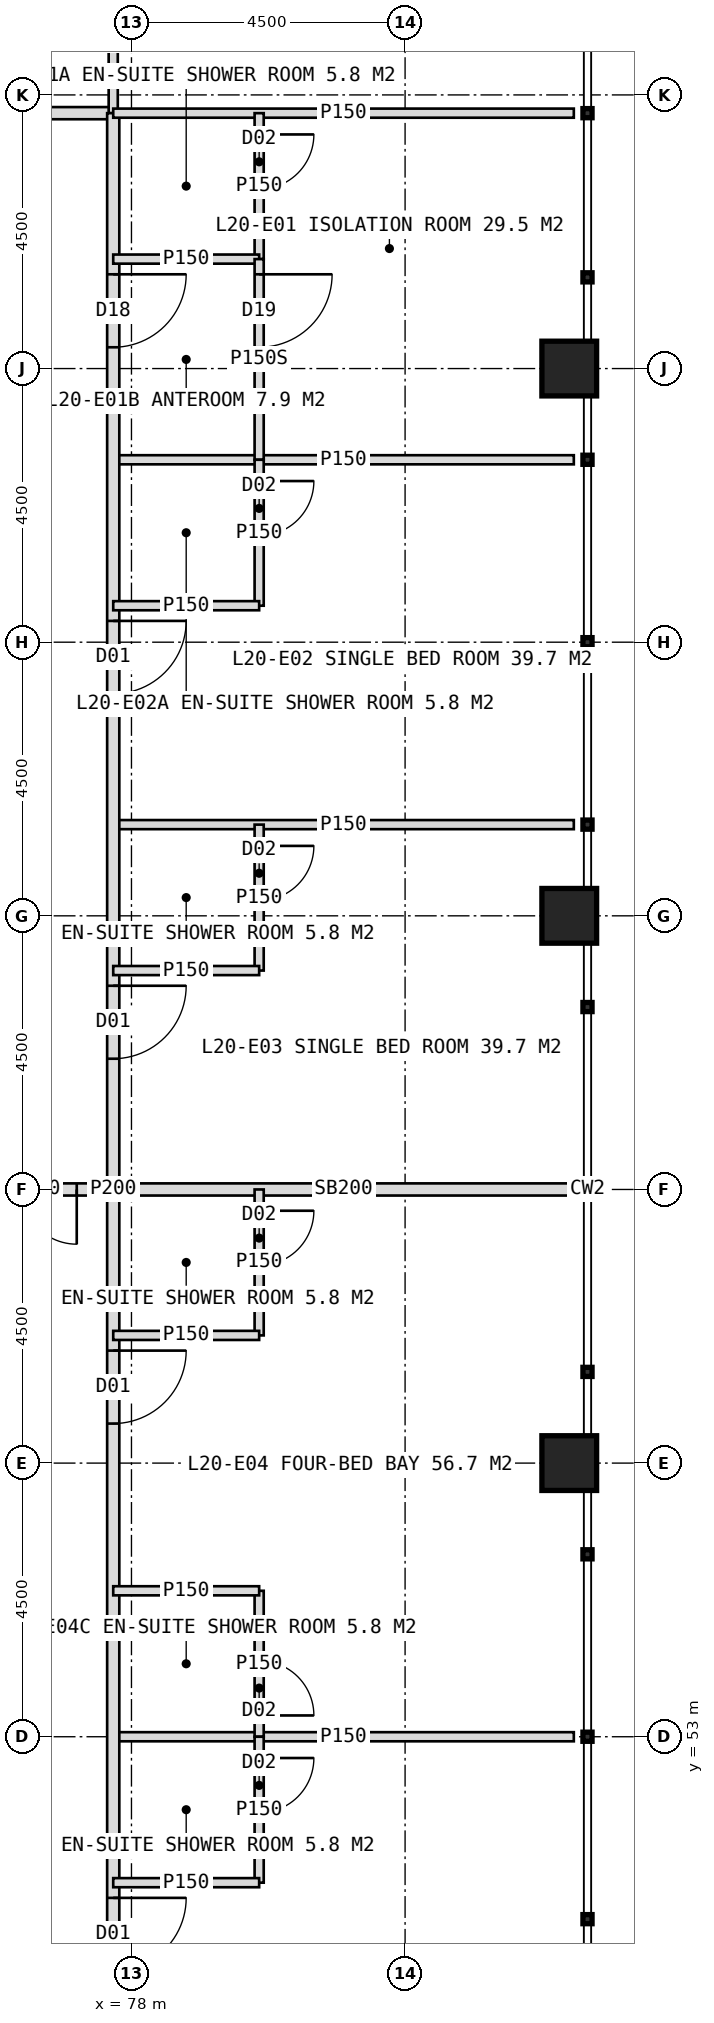
"""IFC4 building model, lengths in metres.
Left out: names, types, materials, properties, quantities, classifications, styles, units other than length and angle.
Written with IfcOpenShell. Run it as: python <this file> out.ifc"""

import sys

from ifc_helpers import new_model, si_unit, direction, frame, frame_2d, origin, origin_2d, place, context, subcontext, project, spatial, rectangle, hollow_rectangle, extrude, element, fill, save


model = new_model("IFC4")
c1 = context("Model", 3, precision=1e-05, world=origin(), true_north=direction((0.0, 1.0)))
c2 = subcontext(c1, "Body", "Model", "MODEL_VIEW")
j1 = project(units=[si_unit("LENGTHUNIT", "METRE"), si_unit("PLANEANGLEUNIT", "RADIAN")], contexts=[c1])
p1 = place(None, origin())
s1 = spatial("IfcSite", under=j1, at=p1, CompositionType="ELEMENT")
p2 = place(p1, origin())
s2 = spatial("IfcBuilding", under=s1, at=p2, CompositionType="ELEMENT")
p3 = place(p2, frame((0.0, 0.0, 87.0)))
s3 = spatial("IfcBuildingStorey", under=s2, at=p3, CompositionType="ELEMENT", Elevation=87.0)
for number, where, z_axis, x_axis in (
    (1, (85.2, 57.5, 0.0), (0.0, 0.0, 1.0), (1.0, 0.0, 0.0)),
    (2, (85.2, 66.5, 0.0), (0.0, 0.0, 1.0), (1.0, 0.0, 0.0)),
    (3, (85.2, 75.5, 0.0), (0.0, 0.0, 1.0), (1.0, 0.0, 0.0)),
):
    element("IfcColumn", number, at=place(p3, frame(where, z_axis=z_axis, x_axis=x_axis)), inside=s3, PredefinedType="COLUMN", context=c2, shape_type="SweptSolid", body=[
        extrude(hollow_rectangle(XDim=0.9, YDim=0.9, WallThickness=0.08, at=origin_2d()), origin(), (0.0, 0.0, 1.0), 4.0),
    ])
p4 = place(p3, frame((42.3, 79.7, 0.0), z_axis=(0.0, 0.0, 1.0), x_axis=(1.0, 0.0, 0.0)))
e4 = element("IfcWall", 4, at=p4, inside=s3, PredefinedType="PARTITIONING", context=c2, shape_type="SweptSolid", body=[
    extrude(rectangle(XDim=35.4, YDim=0.2, at=frame_2d((17.7, 0.0))), origin(), (0.0, 0.0, 1.0), 3.75),
])
p5 = place(p4, frame((2.65, 0.0, 0.0)))
e5 = element("IfcOpeningElement", 5, at=p5, cuts=e4, PredefinedType="OPENING", context=c2, shape_type="SweptSolid", body=[
    extrude(rectangle(XDim=1.2, YDim=2.2, at=frame_2d((0.6, 1.1))), frame((0.0, 0.11, 0.0), z_axis=(0.0, -1.0, 0.0), x_axis=(1.0, 0.0, 0.0)), (0.0, 0.0, 1.0), 0.22),
])
p6 = place(p4, frame((11.2, 0.0, 0.0)))
e6 = element("IfcOpeningElement", 6, at=p6, cuts=e4, PredefinedType="OPENING", context=c2, shape_type="SweptSolid", body=[
    extrude(rectangle(XDim=1.0, YDim=2.1, at=frame_2d((0.5, 1.05))), frame((0.0, 0.11, 0.0), z_axis=(0.0, -1.0, 0.0), x_axis=(1.0, 0.0, 0.0)), (0.0, 0.0, 1.0), 0.22),
])
p7 = place(p4, frame((17.2, 0.0, 0.0)))
e7 = element("IfcOpeningElement", 7, at=p7, cuts=e4, PredefinedType="OPENING", context=c2, shape_type="SweptSolid", body=[
    extrude(rectangle(XDim=1.0, YDim=2.1, at=frame_2d((0.5, 1.05))), frame((0.0, 0.11, 0.0), z_axis=(0.0, -1.0, 0.0), x_axis=(1.0, 0.0, 0.0)), (0.0, 0.0, 1.0), 0.22),
])
p8 = place(p4, frame((23.35, 0.0, 0.0)))
e8 = element("IfcOpeningElement", 8, at=p8, cuts=e4, PredefinedType="OPENING", context=c2, shape_type="SweptSolid", body=[
    extrude(rectangle(XDim=1.2, YDim=2.2, at=frame_2d((0.6, 1.1))), frame((0.0, 0.11, 0.0), z_axis=(0.0, -1.0, 0.0), x_axis=(1.0, 0.0, 0.0)), (0.0, 0.0, 1.0), 0.22),
])
p9 = place(p4, frame((29.35, 0.0, 0.0)))
e9 = element("IfcOpeningElement", 9, at=p9, cuts=e4, PredefinedType="OPENING", context=c2, shape_type="SweptSolid", body=[
    extrude(rectangle(XDim=1.2, YDim=2.2, at=frame_2d((0.6, 1.1))), frame((0.0, 0.11, 0.0), z_axis=(0.0, -1.0, 0.0), x_axis=(1.0, 0.0, 0.0)), (0.0, 0.0, 1.0), 0.22),
])
p10 = place(p3, frame((77.7, 79.7, 0.0), z_axis=(0.0, 0.0, 1.0), x_axis=(0.0, 1.0, 0.0)))
e10 = element("IfcWall", 10, at=p10, inside=s3, PredefinedType="PARTITIONING", context=c2, shape_type="SweptSolid", body=[
    extrude(rectangle(XDim=2.4, YDim=0.15, at=frame_2d((1.2, 0.0))), origin(), (0.0, 0.0, 1.0), 3.75),
])
for number, where, z_axis, x_axis in (
    (11, (77.7, 74.0, 0.0), (0.0, 0.0, 1.0), (1.0, 0.0, 0.0)),
    (12, (77.7, 68.0, 0.0), (0.0, 0.0, 1.0), (1.0, 0.0, 0.0)),
):
    element("IfcWall", number, at=place(p3, frame(where, z_axis=z_axis, x_axis=x_axis)), inside=s3, PredefinedType="PARTITIONING", context=c2, shape_type="SweptSolid", body=[
        extrude(rectangle(XDim=7.575, YDim=0.15, at=frame_2d((3.788, 0.0))), origin(), (0.0, 0.0, 1.0), 3.75),
    ])
p11 = place(p3, frame((77.7, 62.0, 0.0), z_axis=(0.0, 0.0, 1.0), x_axis=(1.0, 0.0, 0.0)))
e13 = element("IfcWall", 13, at=p11, inside=s3, PredefinedType="SOLIDWALL", context=c2, shape_type="SweptSolid", body=[
    extrude(rectangle(XDim=7.575, YDim=0.2, at=frame_2d((3.788, 0.0))), origin(), (0.0, 0.0, 1.0), 2.75),
])
p12 = place(p3, frame((77.7, 53.0, 0.0), z_axis=(0.0, 0.0, 1.0), x_axis=(1.0, 0.0, 0.0)))
e14 = element("IfcWall", 14, at=p12, inside=s3, PredefinedType="PARTITIONING", context=c2, shape_type="SweptSolid", body=[
    extrude(rectangle(XDim=7.575, YDim=0.15, at=frame_2d((3.788, 0.0))), origin(), (0.0, 0.0, 1.0), 3.75),
])
p13 = place(p3, frame((77.7, 79.7, 0.0), z_axis=(0.0, 0.0, 1.0), x_axis=(0.0, -1.0, 0.0)))
e15 = element("IfcWall", 15, at=p13, inside=s3, PredefinedType="PARTITIONING", context=c2, shape_type="SweptSolid", body=[
    extrude(rectangle(XDim=35.4, YDim=0.2, at=frame_2d((17.7, 0.0))), origin(), (0.0, 0.0, 1.0), 3.75),
])
p14 = place(p13, frame((2.65, 0.0, 0.0)))
e16 = element("IfcOpeningElement", 16, at=p14, cuts=e15, PredefinedType="OPENING", context=c2, shape_type="SweptSolid", body=[
    extrude(rectangle(XDim=1.2, YDim=2.2, at=frame_2d((0.6, 1.1))), frame((0.0, 0.11, 0.0), z_axis=(0.0, -1.0, 0.0), x_axis=(1.0, 0.0, 0.0)), (0.0, 0.0, 1.0), 0.22),
])
p15 = place(p13, frame((8.35, 0.0, 0.0)))
e17 = element("IfcOpeningElement", 17, at=p15, cuts=e15, PredefinedType="OPENING", context=c2, shape_type="SweptSolid", body=[
    extrude(rectangle(XDim=1.2, YDim=2.2, at=frame_2d((0.6, 1.1))), frame((0.0, 0.11, 0.0), z_axis=(0.0, -1.0, 0.0), x_axis=(1.0, 0.0, 0.0)), (0.0, 0.0, 1.0), 0.22),
])
p16 = place(p13, frame((14.35, 0.0, 0.0)))
e18 = element("IfcOpeningElement", 18, at=p16, cuts=e15, PredefinedType="OPENING", context=c2, shape_type="SweptSolid", body=[
    extrude(rectangle(XDim=1.2, YDim=2.2, at=frame_2d((0.6, 1.1))), frame((0.0, 0.11, 0.0), z_axis=(0.0, -1.0, 0.0), x_axis=(1.0, 0.0, 0.0)), (0.0, 0.0, 1.0), 0.22),
])
p17 = place(p13, frame((20.35, 0.0, 0.0)))
e19 = element("IfcOpeningElement", 19, at=p17, cuts=e15, PredefinedType="OPENING", context=c2, shape_type="SweptSolid", body=[
    extrude(rectangle(XDim=1.2, YDim=2.2, at=frame_2d((0.6, 1.1))), frame((0.0, 0.11, 0.0), z_axis=(0.0, -1.0, 0.0), x_axis=(1.0, 0.0, 0.0)), (0.0, 0.0, 1.0), 0.22),
])
p18 = place(p13, frame((29.35, 0.0, 0.0)))
e20 = element("IfcOpeningElement", 20, at=p18, cuts=e15, PredefinedType="OPENING", context=c2, shape_type="SweptSolid", body=[
    extrude(rectangle(XDim=1.2, YDim=2.2, at=frame_2d((0.6, 1.1))), frame((0.0, 0.11, 0.0), z_axis=(0.0, -1.0, 0.0), x_axis=(1.0, 0.0, 0.0)), (0.0, 0.0, 1.0), 0.22),
])
p19 = place(p3, frame((77.7, 79.7, 0.0), z_axis=(0.0, 0.0, 1.0), x_axis=(1.0, 0.0, 0.0)))
e21 = element("IfcWall", 21, at=p19, inside=s3, PredefinedType="PARTITIONING", context=c2, shape_type="SweptSolid", body=[
    extrude(rectangle(XDim=7.575, YDim=0.15, at=frame_2d((3.788, 0.0))), origin(), (0.0, 0.0, 1.0), 3.75),
])
p20 = place(p3, frame((80.1, 79.7, 0.0), z_axis=(0.0, 0.0, 1.0), x_axis=(0.0, -1.0, 0.0)))
e22 = element("IfcWall", 22, at=p20, inside=s3, PredefinedType="PARTITIONING", context=c2, shape_type="SweptSolid", body=[
    extrude(rectangle(XDim=2.4, YDim=0.15, at=frame_2d((1.2, 0.0))), origin(), (0.0, 0.0, 1.0), 3.75),
])
p21 = place(p20, frame((0.35, 0.0, 0.0)))
e23 = element("IfcOpeningElement", 23, at=p21, cuts=e22, PredefinedType="OPENING", context=c2, shape_type="SweptSolid", body=[
    extrude(rectangle(XDim=0.9, YDim=2.1, at=frame_2d((0.45, 1.05))), frame((0.0, 0.085, 0.0), z_axis=(0.0, -1.0, 0.0), x_axis=(1.0, 0.0, 0.0)), (0.0, 0.0, 1.0), 0.17),
])
p22 = place(p3, frame((77.7, 77.3, 0.0), z_axis=(0.0, 0.0, 1.0), x_axis=(1.0, 0.0, 0.0)))
e24 = element("IfcWall", 24, at=p22, inside=s3, PredefinedType="PARTITIONING", context=c2, shape_type="SweptSolid", body=[
    extrude(rectangle(XDim=2.4, YDim=0.15, at=frame_2d((1.2, 0.0))), origin(), (0.0, 0.0, 1.0), 3.75),
])
p23 = place(p3, frame((80.1, 77.3, 0.0), z_axis=(0.0, 0.0, 1.0), x_axis=(0.0, -1.0, 0.0)))
e25 = element("IfcWall", 25, at=p23, inside=s3, PredefinedType="PARTITIONING", context=c2, shape_type="SweptSolid", body=[
    extrude(rectangle(XDim=3.3, YDim=0.15, at=frame_2d((1.65, 0.0))), origin(), (0.0, 0.0, 1.0), 3.75),
])
p24 = place(p23, frame((0.25, 0.0, 0.0)))
e26 = element("IfcOpeningElement", 26, at=p24, cuts=e25, PredefinedType="OPENING", context=c2, shape_type="SweptSolid", body=[
    extrude(rectangle(XDim=1.2, YDim=2.2, at=frame_2d((0.6, 1.1))), frame((0.0, 0.085, 0.0), z_axis=(0.0, -1.0, 0.0), x_axis=(1.0, 0.0, 0.0)), (0.0, 0.0, 1.0), 0.17),
])
p25 = place(p3, frame((80.1, 74.0, 0.0), z_axis=(0.0, 0.0, 1.0), x_axis=(0.0, -1.0, 0.0)))
e27 = element("IfcWall", 27, at=p25, inside=s3, PredefinedType="PARTITIONING", context=c2, shape_type="SweptSolid", body=[
    extrude(rectangle(XDim=2.4, YDim=0.15, at=frame_2d((1.2, 0.0))), origin(), (0.0, 0.0, 1.0), 3.75),
])
p26 = place(p25, frame((0.35, 0.0, 0.0)))
e28 = element("IfcOpeningElement", 28, at=p26, cuts=e27, PredefinedType="OPENING", context=c2, shape_type="SweptSolid", body=[
    extrude(rectangle(XDim=0.9, YDim=2.1, at=frame_2d((0.45, 1.05))), frame((0.0, 0.085, 0.0), z_axis=(0.0, -1.0, 0.0), x_axis=(1.0, 0.0, 0.0)), (0.0, 0.0, 1.0), 0.17),
])
p27 = place(p3, frame((77.7, 71.6, 0.0), z_axis=(0.0, 0.0, 1.0), x_axis=(1.0, 0.0, 0.0)))
e29 = element("IfcWall", 29, at=p27, inside=s3, PredefinedType="PARTITIONING", context=c2, shape_type="SweptSolid", body=[
    extrude(rectangle(XDim=2.4, YDim=0.15, at=frame_2d((1.2, 0.0))), origin(), (0.0, 0.0, 1.0), 3.75),
])
p28 = place(p3, frame((80.1, 68.0, 0.0), z_axis=(0.0, 0.0, 1.0), x_axis=(0.0, -1.0, 0.0)))
e30 = element("IfcWall", 30, at=p28, inside=s3, PredefinedType="PARTITIONING", context=c2, shape_type="SweptSolid", body=[
    extrude(rectangle(XDim=2.4, YDim=0.15, at=frame_2d((1.2, 0.0))), origin(), (0.0, 0.0, 1.0), 3.75),
])
p29 = place(p28, frame((0.35, 0.0, 0.0)))
e31 = element("IfcOpeningElement", 31, at=p29, cuts=e30, PredefinedType="OPENING", context=c2, shape_type="SweptSolid", body=[
    extrude(rectangle(XDim=0.9, YDim=2.1, at=frame_2d((0.45, 1.05))), frame((0.0, 0.085, 0.0), z_axis=(0.0, -1.0, 0.0), x_axis=(1.0, 0.0, 0.0)), (0.0, 0.0, 1.0), 0.17),
])
p30 = place(p3, frame((77.7, 65.6, 0.0), z_axis=(0.0, 0.0, 1.0), x_axis=(1.0, 0.0, 0.0)))
e32 = element("IfcWall", 32, at=p30, inside=s3, PredefinedType="PARTITIONING", context=c2, shape_type="SweptSolid", body=[
    extrude(rectangle(XDim=2.4, YDim=0.15, at=frame_2d((1.2, 0.0))), origin(), (0.0, 0.0, 1.0), 3.75),
])
p31 = place(p3, frame((80.1, 62.0, 0.0), z_axis=(0.0, 0.0, 1.0), x_axis=(0.0, -1.0, 0.0)))
e33 = element("IfcWall", 33, at=p31, inside=s3, PredefinedType="PARTITIONING", context=c2, shape_type="SweptSolid", body=[
    extrude(rectangle(XDim=2.4, YDim=0.15, at=frame_2d((1.2, 0.0))), origin(), (0.0, 0.0, 1.0), 3.75),
])
p32 = place(p31, frame((0.35, 0.0, 0.0)))
e34 = element("IfcOpeningElement", 34, at=p32, cuts=e33, PredefinedType="OPENING", context=c2, shape_type="SweptSolid", body=[
    extrude(rectangle(XDim=0.9, YDim=2.1, at=frame_2d((0.45, 1.05))), frame((0.0, 0.085, 0.0), z_axis=(0.0, -1.0, 0.0), x_axis=(1.0, 0.0, 0.0)), (0.0, 0.0, 1.0), 0.17),
])
p33 = place(p3, frame((77.7, 59.6, 0.0), z_axis=(0.0, 0.0, 1.0), x_axis=(1.0, 0.0, 0.0)))
e35 = element("IfcWall", 35, at=p33, inside=s3, PredefinedType="PARTITIONING", context=c2, shape_type="SweptSolid", body=[
    extrude(rectangle(XDim=2.4, YDim=0.15, at=frame_2d((1.2, 0.0))), origin(), (0.0, 0.0, 1.0), 3.75),
])
p34 = place(p3, frame((80.1, 55.4, 0.0), z_axis=(0.0, 0.0, 1.0), x_axis=(0.0, -1.0, 0.0)))
e36 = element("IfcWall", 36, at=p34, inside=s3, PredefinedType="PARTITIONING", context=c2, shape_type="SweptSolid", body=[
    extrude(rectangle(XDim=2.4, YDim=0.15, at=frame_2d((1.2, 0.0))), origin(), (0.0, 0.0, 1.0), 3.75),
])
p35 = place(p34, frame((1.15, 0.0, 0.0)))
e37 = element("IfcOpeningElement", 37, at=p35, cuts=e36, PredefinedType="OPENING", context=c2, shape_type="SweptSolid", body=[
    extrude(rectangle(XDim=0.9, YDim=2.1, at=frame_2d((0.45, 1.05))), frame((0.0, 0.085, 0.0), z_axis=(0.0, -1.0, 0.0), x_axis=(1.0, 0.0, 0.0)), (0.0, 0.0, 1.0), 0.17),
])
p36 = place(p3, frame((77.7, 55.4, 0.0), z_axis=(0.0, 0.0, 1.0), x_axis=(1.0, 0.0, 0.0)))
e38 = element("IfcWall", 38, at=p36, inside=s3, PredefinedType="PARTITIONING", context=c2, shape_type="SweptSolid", body=[
    extrude(rectangle(XDim=2.4, YDim=0.15, at=frame_2d((1.2, 0.0))), origin(), (0.0, 0.0, 1.0), 3.75),
])
p37 = place(p3, frame((80.1, 53.0, 0.0), z_axis=(0.0, 0.0, 1.0), x_axis=(0.0, -1.0, 0.0)))
e39 = element("IfcWall", 39, at=p37, inside=s3, PredefinedType="PARTITIONING", context=c2, shape_type="SweptSolid", body=[
    extrude(rectangle(XDim=2.4, YDim=0.15, at=frame_2d((1.2, 0.0))), origin(), (0.0, 0.0, 1.0), 3.75),
])
p38 = place(p37, frame((0.35, 0.0, 0.0)))
e40 = element("IfcOpeningElement", 40, at=p38, cuts=e39, PredefinedType="OPENING", context=c2, shape_type="SweptSolid", body=[
    extrude(rectangle(XDim=0.9, YDim=2.1, at=frame_2d((0.45, 1.05))), frame((0.0, 0.085, 0.0), z_axis=(0.0, -1.0, 0.0), x_axis=(1.0, 0.0, 0.0)), (0.0, 0.0, 1.0), 0.17),
])
p39 = place(p3, frame((77.7, 50.6, 0.0), z_axis=(0.0, 0.0, 1.0), x_axis=(1.0, 0.0, 0.0)))
e41 = element("IfcWall", 41, at=p39, inside=s3, PredefinedType="PARTITIONING", context=c2, shape_type="SweptSolid", body=[
    extrude(rectangle(XDim=2.4, YDim=0.15, at=frame_2d((1.2, 0.0))), origin(), (0.0, 0.0, 1.0), 3.75),
])
p40 = place(p3, frame((75.0, 62.0, 0.0), z_axis=(0.0, 0.0, 1.0), x_axis=(1.0, 0.0, 0.0)))
e42 = element("IfcWall", 42, at=p40, inside=s3, PredefinedType="SOLIDWALL", context=c2, shape_type="SweptSolid", body=[
    extrude(rectangle(XDim=2.7, YDim=0.2, at=frame_2d((1.35, 0.0))), origin(), (0.0, 0.0, 1.0), 2.75),
])
p41 = place(p40, frame((0.3, 0.0, 0.0)))
e43 = element("IfcOpeningElement", 43, at=p41, cuts=e42, PredefinedType="OPENING", context=c2, shape_type="SweptSolid", body=[
    extrude(rectangle(XDim=1.8, YDim=2.2, at=frame_2d((0.9, 1.1))), frame((0.0, 0.11, 0.0), z_axis=(0.0, -1.0, 0.0), x_axis=(1.0, 0.0, 0.0)), (0.0, 0.0, 1.0), 0.22),
])
p42 = place(p24, origin())
e44 = element("IfcDoor", 44, at=p42, inside=s3, OperationType="SINGLE_SWING_LEFT", PredefinedType="DOOR", context=c2, shape_type="SweptSolid", body=[
    extrude(rectangle(XDim=1.2, YDim=2.2, at=frame_2d((0.6, 1.1))), frame((0.0, 0.025, 0.0), z_axis=(0.0, -1.0, 0.0), x_axis=(1.0, 0.0, 0.0)), (0.0, 0.0, 1.0), 0.05),
])
fill(e26, e44)
p43 = place(p14, origin())
e45 = element("IfcDoor", 45, at=p43, inside=s3, OperationType="SINGLE_SWING_LEFT", PredefinedType="DOOR", context=c2, shape_type="SweptSolid", body=[
    extrude(rectangle(XDim=1.2, YDim=2.2, at=frame_2d((0.6, 1.1))), frame((0.0, 0.025, 0.0), z_axis=(0.0, -1.0, 0.0), x_axis=(1.0, 0.0, 0.0)), (0.0, 0.0, 1.0), 0.05),
])
fill(e16, e45)
p44 = place(p21, origin())
e46 = element("IfcDoor", 46, at=p44, inside=s3, OperationType="SINGLE_SWING_LEFT", PredefinedType="DOOR", context=c2, shape_type="SweptSolid", body=[
    extrude(rectangle(XDim=0.9, YDim=2.1, at=frame_2d((0.45, 1.05))), frame((0.0, 0.025, 0.0), z_axis=(0.0, -1.0, 0.0), x_axis=(1.0, 0.0, 0.0)), (0.0, 0.0, 1.0), 0.05),
])
fill(e23, e46)
p45 = place(p15, origin())
e47 = element("IfcDoor", 47, at=p45, inside=s3, OperationType="SINGLE_SWING_LEFT", PredefinedType="DOOR", context=c2, shape_type="SweptSolid", body=[
    extrude(rectangle(XDim=1.2, YDim=2.2, at=frame_2d((0.6, 1.1))), frame((0.0, 0.025, 0.0), z_axis=(0.0, -1.0, 0.0), x_axis=(1.0, 0.0, 0.0)), (0.0, 0.0, 1.0), 0.05),
])
fill(e17, e47)
p46 = place(p26, origin())
e48 = element("IfcDoor", 48, at=p46, inside=s3, OperationType="SINGLE_SWING_LEFT", PredefinedType="DOOR", context=c2, shape_type="SweptSolid", body=[
    extrude(rectangle(XDim=0.9, YDim=2.1, at=frame_2d((0.45, 1.05))), frame((0.0, 0.025, 0.0), z_axis=(0.0, -1.0, 0.0), x_axis=(1.0, 0.0, 0.0)), (0.0, 0.0, 1.0), 0.05),
])
fill(e28, e48)
p47 = place(p16, origin())
e49 = element("IfcDoor", 49, at=p47, inside=s3, OperationType="SINGLE_SWING_LEFT", PredefinedType="DOOR", context=c2, shape_type="SweptSolid", body=[
    extrude(rectangle(XDim=1.2, YDim=2.2, at=frame_2d((0.6, 1.1))), frame((0.0, 0.025, 0.0), z_axis=(0.0, -1.0, 0.0), x_axis=(1.0, 0.0, 0.0)), (0.0, 0.0, 1.0), 0.05),
])
fill(e18, e49)
p48 = place(p29, origin())
e50 = element("IfcDoor", 50, at=p48, inside=s3, OperationType="SINGLE_SWING_LEFT", PredefinedType="DOOR", context=c2, shape_type="SweptSolid", body=[
    extrude(rectangle(XDim=0.9, YDim=2.1, at=frame_2d((0.45, 1.05))), frame((0.0, 0.025, 0.0), z_axis=(0.0, -1.0, 0.0), x_axis=(1.0, 0.0, 0.0)), (0.0, 0.0, 1.0), 0.05),
])
fill(e31, e50)
p49 = place(p17, origin())
e51 = element("IfcDoor", 51, at=p49, inside=s3, OperationType="SINGLE_SWING_LEFT", PredefinedType="DOOR", context=c2, shape_type="SweptSolid", body=[
    extrude(rectangle(XDim=1.2, YDim=2.2, at=frame_2d((0.6, 1.1))), frame((0.0, 0.025, 0.0), z_axis=(0.0, -1.0, 0.0), x_axis=(1.0, 0.0, 0.0)), (0.0, 0.0, 1.0), 0.05),
])
fill(e19, e51)
p50 = place(p32, origin())
e52 = element("IfcDoor", 52, at=p50, inside=s3, OperationType="SINGLE_SWING_LEFT", PredefinedType="DOOR", context=c2, shape_type="SweptSolid", body=[
    extrude(rectangle(XDim=0.9, YDim=2.1, at=frame_2d((0.45, 1.05))), frame((0.0, 0.025, 0.0), z_axis=(0.0, -1.0, 0.0), x_axis=(1.0, 0.0, 0.0)), (0.0, 0.0, 1.0), 0.05),
])
fill(e34, e52)
p51 = place(p35, origin())
e53 = element("IfcDoor", 53, at=p51, inside=s3, OperationType="SINGLE_SWING_RIGHT", PredefinedType="DOOR", context=c2, shape_type="SweptSolid", body=[
    extrude(rectangle(XDim=0.9, YDim=2.1, at=frame_2d((0.45, 1.05))), frame((0.0, 0.025, 0.0), z_axis=(0.0, -1.0, 0.0), x_axis=(1.0, 0.0, 0.0)), (0.0, 0.0, 1.0), 0.05),
])
fill(e37, e53)
p52 = place(p18, origin())
e54 = element("IfcDoor", 54, at=p52, inside=s3, OperationType="SINGLE_SWING_LEFT", PredefinedType="DOOR", context=c2, shape_type="SweptSolid", body=[
    extrude(rectangle(XDim=1.2, YDim=2.2, at=frame_2d((0.6, 1.1))), frame((0.0, 0.025, 0.0), z_axis=(0.0, -1.0, 0.0), x_axis=(1.0, 0.0, 0.0)), (0.0, 0.0, 1.0), 0.05),
])
fill(e20, e54)
p53 = place(p38, origin())
e55 = element("IfcDoor", 55, at=p53, inside=s3, OperationType="SINGLE_SWING_LEFT", PredefinedType="DOOR", context=c2, shape_type="SweptSolid", body=[
    extrude(rectangle(XDim=0.9, YDim=2.1, at=frame_2d((0.45, 1.05))), frame((0.0, 0.025, 0.0), z_axis=(0.0, -1.0, 0.0), x_axis=(1.0, 0.0, 0.0)), (0.0, 0.0, 1.0), 0.05),
])
fill(e40, e55)
p54 = place(p41, origin())
e56 = element("IfcDoor", 56, at=p54, inside=s3, OperationType="DOUBLE_DOOR_DOUBLE_SWING", PredefinedType="DOOR", context=c2, shape_type="SweptSolid", body=[
    extrude(rectangle(XDim=1.8, YDim=2.2, at=frame_2d((0.9, 1.1))), frame((0.0, 0.025, 0.0), z_axis=(0.0, -1.0, 0.0), x_axis=(1.0, 0.0, 0.0)), (0.0, 0.0, 1.0), 0.05),
])
fill(e43, e56)
save(model, sys.argv[1])
